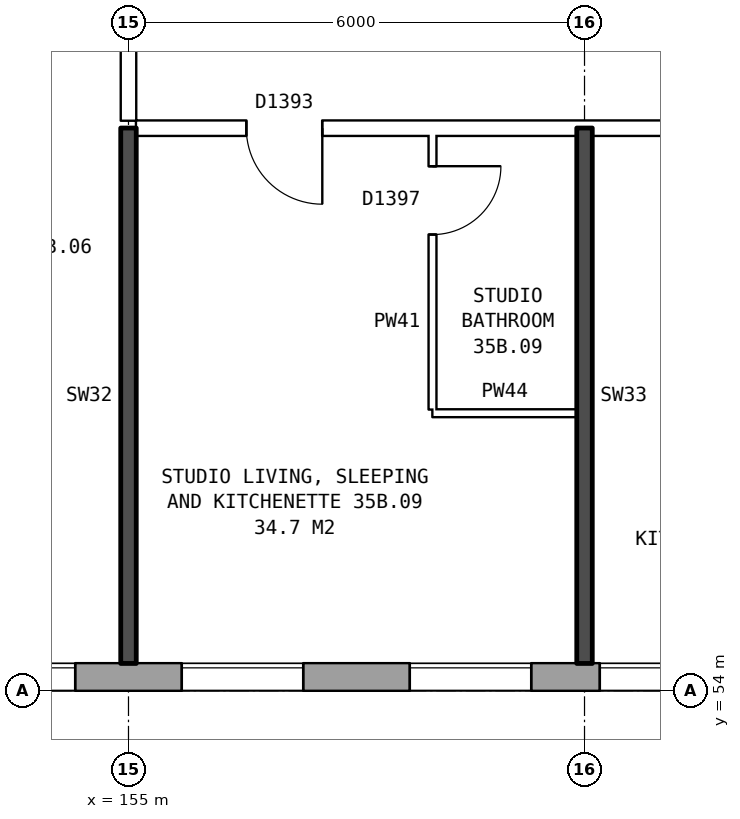
"""IFC4 building model, lengths in metres.
Left out: names, types, materials, properties, quantities, classifications, styles, units other than length and angle.
Written with IfcOpenShell. Run it as: python <this file> out.ifc"""

import sys

from ifc_helpers import new_model, si_unit, direction, frame, frame_2d, origin, place, context, subcontext, project, spatial, rectangle, extrude, element, fill, save


model = new_model("IFC4")
c1 = context("Model", 3, precision=1e-05, world=origin(), true_north=direction((0.0, 1.0)))
c2 = subcontext(c1, "Body", "Model", "MODEL_VIEW")
j1 = project(units=[si_unit("LENGTHUNIT", "METRE"), si_unit("PLANEANGLEUNIT", "RADIAN")], contexts=[c1])
p1 = place(None, origin())
s1 = spatial("IfcSite", under=j1, at=p1, CompositionType="ELEMENT")
p2 = place(p1, origin())
s2 = spatial("IfcBuilding", under=s1, at=p2, CompositionType="ELEMENT")
p3 = place(p2, frame((0.0, 0.0, 126.8)))
s3 = spatial("IfcBuildingStorey", under=s2, at=p3, CompositionType="ELEMENT", Elevation=126.8)
p4 = place(p3, frame((134.075, 54.18, 0.0), z_axis=(0.0, 0.0, 1.0), x_axis=(1.0, 0.0, 0.0)))
e1 = element("IfcWall", 1, at=p4, inside=s3, PredefinedType="STANDARD", context=c2, shape_type="SweptSolid", body=[
    extrude(rectangle(XDim=35.601, YDim=0.36, at=frame_2d((17.8, 0.0))), origin(), (0.0, 0.0, 1.0), 2.85),
])
p5 = place(p4, frame((0.625, 0.0, 0.8)))
e2 = element("IfcOpeningElement", 2, at=p5, cuts=e1, PredefinedType="OPENING", context=c2, shape_type="SweptSolid", body=[
    extrude(rectangle(XDim=1.6, YDim=1.8, at=frame_2d((0.8, 0.9))), frame((0.0, 0.19, 0.0), z_axis=(0.0, -1.0, 0.0), x_axis=(1.0, 0.0, 0.0)), (0.0, 0.0, 1.0), 0.38),
])
p6 = place(p4, frame((3.125, 0.0, 0.8)))
e3 = element("IfcOpeningElement", 3, at=p6, cuts=e1, PredefinedType="OPENING", context=c2, shape_type="SweptSolid", body=[
    extrude(rectangle(XDim=0.8, YDim=1.8, at=frame_2d((0.4, 0.9))), frame((0.0, 0.19, 0.0), z_axis=(0.0, -1.0, 0.0), x_axis=(1.0, 0.0, 0.0)), (0.0, 0.0, 1.0), 0.38),
])
p7 = place(p4, frame((6.625, 0.0, 0.8)))
e4 = element("IfcOpeningElement", 4, at=p7, cuts=e1, PredefinedType="OPENING", context=c2, shape_type="SweptSolid", body=[
    extrude(rectangle(XDim=1.6, YDim=1.8, at=frame_2d((0.8, 0.9))), frame((0.0, 0.19, 0.0), z_axis=(0.0, -1.0, 0.0), x_axis=(1.0, 0.0, 0.0)), (0.0, 0.0, 1.0), 0.38),
])
p8 = place(p4, frame((9.625, 0.0, 0.8)))
e5 = element("IfcOpeningElement", 5, at=p8, cuts=e1, PredefinedType="OPENING", context=c2, shape_type="SweptSolid", body=[
    extrude(rectangle(XDim=1.6, YDim=1.8, at=frame_2d((0.8, 0.9))), frame((0.0, 0.19, 0.0), z_axis=(0.0, -1.0, 0.0), x_axis=(1.0, 0.0, 0.0)), (0.0, 0.0, 1.0), 0.38),
])
p9 = place(p4, frame((12.625, 0.0, 0.8)))
e6 = element("IfcOpeningElement", 6, at=p9, cuts=e1, PredefinedType="OPENING", context=c2, shape_type="SweptSolid", body=[
    extrude(rectangle(XDim=1.6, YDim=1.8, at=frame_2d((0.8, 0.9))), frame((0.0, 0.19, 0.0), z_axis=(0.0, -1.0, 0.0), x_axis=(1.0, 0.0, 0.0)), (0.0, 0.0, 1.0), 0.38),
])
p10 = place(p4, frame((15.625, 0.0, 0.8)))
e7 = element("IfcOpeningElement", 7, at=p10, cuts=e1, PredefinedType="OPENING", context=c2, shape_type="SweptSolid", body=[
    extrude(rectangle(XDim=1.6, YDim=1.8, at=frame_2d((0.8, 0.9))), frame((0.0, 0.19, 0.0), z_axis=(0.0, -1.0, 0.0), x_axis=(1.0, 0.0, 0.0)), (0.0, 0.0, 1.0), 0.38),
])
p11 = place(p4, frame((18.625, 0.0, 0.8)))
e8 = element("IfcOpeningElement", 8, at=p11, cuts=e1, PredefinedType="OPENING", context=c2, shape_type="SweptSolid", body=[
    extrude(rectangle(XDim=1.6, YDim=1.8, at=frame_2d((0.8, 0.9))), frame((0.0, 0.19, 0.0), z_axis=(0.0, -1.0, 0.0), x_axis=(1.0, 0.0, 0.0)), (0.0, 0.0, 1.0), 0.38),
])
p12 = place(p4, frame((21.625, 0.0, 0.8)))
e9 = element("IfcOpeningElement", 9, at=p12, cuts=e1, PredefinedType="OPENING", context=c2, shape_type="SweptSolid", body=[
    extrude(rectangle(XDim=1.6, YDim=1.8, at=frame_2d((0.8, 0.9))), frame((0.0, 0.19, 0.0), z_axis=(0.0, -1.0, 0.0), x_axis=(1.0, 0.0, 0.0)), (0.0, 0.0, 1.0), 0.38),
])
p13 = place(p4, frame((24.625, 0.0, 0.8)))
e10 = element("IfcOpeningElement", 10, at=p13, cuts=e1, PredefinedType="OPENING", context=c2, shape_type="SweptSolid", body=[
    extrude(rectangle(XDim=1.6, YDim=1.8, at=frame_2d((0.8, 0.9))), frame((0.0, 0.19, 0.0), z_axis=(0.0, -1.0, 0.0), x_axis=(1.0, 0.0, 0.0)), (0.0, 0.0, 1.0), 0.38),
])
p14 = place(p4, frame((27.125, 0.0, 0.8)))
e11 = element("IfcOpeningElement", 11, at=p14, cuts=e1, PredefinedType="OPENING", context=c2, shape_type="SweptSolid", body=[
    extrude(rectangle(XDim=1.6, YDim=1.8, at=frame_2d((0.8, 0.9))), frame((0.0, 0.19, 0.0), z_axis=(0.0, -1.0, 0.0), x_axis=(1.0, 0.0, 0.0)), (0.0, 0.0, 1.0), 0.38),
])
p15 = place(p4, frame((29.025, 0.0, 0.8)))
e12 = element("IfcOpeningElement", 12, at=p15, cuts=e1, PredefinedType="OPENING", context=c2, shape_type="SweptSolid", body=[
    extrude(rectangle(XDim=0.6, YDim=0.9, at=frame_2d((0.3, 0.45))), frame((0.0, 0.19, 0.0), z_axis=(0.0, -1.0, 0.0), x_axis=(1.0, 0.0, 0.0)), (0.0, 0.0, 1.0), 0.38),
])
p16 = place(p4, frame((33.625, 0.0, 0.8)))
e13 = element("IfcOpeningElement", 13, at=p16, cuts=e1, PredefinedType="OPENING", context=c2, shape_type="SweptSolid", body=[
    extrude(rectangle(XDim=1.6, YDim=1.8, at=frame_2d((0.8, 0.9))), frame((0.0, 0.19, 0.0), z_axis=(0.0, -1.0, 0.0), x_axis=(1.0, 0.0, 0.0)), (0.0, 0.0, 1.0), 0.38),
])
p17 = place(p4, frame((4.225, 0.0, 1.6)))
e14 = element("IfcOpeningElement", 14, at=p17, cuts=e1, PredefinedType="OPENING", context=c2, shape_type="SweptSolid", body=[
    extrude(rectangle(XDim=0.6, YDim=0.9, at=frame_2d((0.3, 0.45))), frame((0.0, 0.19, 0.0), z_axis=(0.0, -1.0, 0.0), x_axis=(1.0, 0.0, 0.0)), (0.0, 0.0, 1.0), 0.38),
])
p18 = place(p4, frame((30.675, 0.0, 1.7)))
e15 = element("IfcOpeningElement", 15, at=p18, cuts=e1, PredefinedType="OPENING", context=c2, shape_type="SweptSolid", body=[
    extrude(rectangle(XDim=0.6, YDim=0.9, at=frame_2d((0.3, 0.45))), frame((0.0, 0.19, 0.0), z_axis=(0.0, -1.0, 0.0), x_axis=(1.0, 0.0, 0.0)), (0.0, 0.0, 1.0), 0.38),
])
p19 = place(p4, frame((31.575, 0.0, 0.8)))
e16 = element("IfcOpeningElement", 16, at=p19, cuts=e1, PredefinedType="OPENING", context=c2, shape_type="SweptSolid", body=[
    extrude(rectangle(XDim=1.0, YDim=1.8, at=frame_2d((0.5, 0.9))), frame((0.0, 0.19, 0.0), z_axis=(0.0, -1.0, 0.0), x_axis=(1.0, 0.0, 0.0)), (0.0, 0.0, 1.0), 0.38),
])
p20 = place(p3, frame((159.0, 57.65, 0.0), z_axis=(0.0, 0.0, 1.0), x_axis=(1.0, 0.0, 0.0)))
e17 = element("IfcWall", 17, at=p20, inside=s3, PredefinedType="PARTITIONING", context=c2, shape_type="SweptSolid", body=[
    extrude(rectangle(XDim=1.9, YDim=0.1, at=frame_2d((0.95, 0.0))), origin(), (0.0, 0.0, 1.0), 2.85),
])
p21 = place(p3, frame((155.1, 61.4, 0.0), z_axis=(0.0, 0.0, 1.0), x_axis=(1.0, 0.0, 0.0)))
e18 = element("IfcWall", 18, at=p21, inside=s3, PredefinedType="PARTITIONING", context=c2, shape_type="SweptSolid", body=[
    extrude(rectangle(XDim=17.29, YDim=0.2, at=frame_2d((8.645, 0.0))), origin(), (0.0, 0.0, 1.0), 2.85),
])
p22 = place(p21, frame((1.45, 0.0, 0.0)))
e19 = element("IfcOpeningElement", 19, at=p22, cuts=e18, PredefinedType="OPENING", context=c2, shape_type="SweptSolid", body=[
    extrude(rectangle(XDim=1.0, YDim=2.1, at=frame_2d((0.5, 1.05))), frame((0.0, 0.11, 0.0), z_axis=(0.0, -1.0, 0.0), x_axis=(1.0, 0.0, 0.0)), (0.0, 0.0, 1.0), 0.22),
])
p23 = place(p21, frame((8.4, 0.0, 0.0)))
e20 = element("IfcOpeningElement", 20, at=p23, cuts=e18, PredefinedType="OPENING", context=c2, shape_type="SweptSolid", body=[
    extrude(rectangle(XDim=1.0, YDim=2.1, at=frame_2d((0.5, 1.05))), frame((0.0, 0.11, 0.0), z_axis=(0.0, -1.0, 0.0), x_axis=(1.0, 0.0, 0.0)), (0.0, 0.0, 1.0), 0.22),
])
p24 = place(p3, frame((155.0, 54.36, 0.0), z_axis=(0.0, 0.0, 1.0), x_axis=(0.0, 1.0, 0.0)))
e21 = element("IfcWall", 21, at=p24, inside=s3, PredefinedType="SOLIDWALL", context=c2, shape_type="SweptSolid", body=[
    extrude(rectangle(XDim=7.04, YDim=0.2, at=frame_2d((3.52, 0.0))), origin(), (0.0, 0.0, 1.0), 2.85),
])
p25 = place(p3, frame((155.0, 61.5, 0.0), z_axis=(0.0, 0.0, 1.0), x_axis=(0.0, 1.0, 0.0)))
e22 = element("IfcWall", 22, at=p25, inside=s3, PredefinedType="PARTITIONING", context=c2, shape_type="SweptSolid", body=[
    extrude(rectangle(XDim=2.2, YDim=0.2, at=frame_2d((1.1, 0.0))), origin(), (0.0, 0.0, 1.0), 2.85),
])
p26 = place(p3, frame((159.0, 57.7, 0.0), z_axis=(0.0, 0.0, 1.0), x_axis=(0.0, 1.0, 0.0)))
e23 = element("IfcWall", 23, at=p26, inside=s3, PredefinedType="PARTITIONING", context=c2, shape_type="SweptSolid", body=[
    extrude(rectangle(XDim=3.6, YDim=0.1, at=frame_2d((1.8, 0.0))), origin(), (0.0, 0.0, 1.0), 2.85),
])
p27 = place(p26, frame((2.3, 0.0, 0.0)))
e24 = element("IfcOpeningElement", 24, at=p27, cuts=e23, PredefinedType="OPENING", context=c2, shape_type="SweptSolid", body=[
    extrude(rectangle(XDim=0.9, YDim=2.1, at=frame_2d((0.45, 1.05))), frame((0.0, 0.06, 0.0), z_axis=(0.0, -1.0, 0.0), x_axis=(1.0, 0.0, 0.0)), (0.0, 0.0, 1.0), 0.12),
])
p28 = place(p3, frame((161.0, 54.36, 0.0), z_axis=(0.0, 0.0, 1.0), x_axis=(0.0, 1.0, 0.0)))
e25 = element("IfcWall", 25, at=p28, inside=s3, PredefinedType="SOLIDWALL", context=c2, shape_type="SweptSolid", body=[
    extrude(rectangle(XDim=7.04, YDim=0.2, at=frame_2d((3.52, 0.0))), origin(), (0.0, 0.0, 1.0), 2.85),
])
p29 = place(p11, origin())
e26 = element("IfcWindow", 26, at=p29, inside=s3, PartitioningType="SINGLE_PANEL", PredefinedType="WINDOW", context=c2, shape_type="SweptSolid", body=[
    extrude(rectangle(XDim=1.6, YDim=1.8, at=frame_2d((0.8, 0.9))), frame((0.0, 0.15, 0.0), z_axis=(0.0, -1.0, 0.0), x_axis=(1.0, 0.0, 0.0)), (0.0, 0.0, 1.0), 0.06),
])
fill(e8, e26)
p30 = place(p12, origin())
e27 = element("IfcWindow", 27, at=p30, inside=s3, PartitioningType="SINGLE_PANEL", PredefinedType="WINDOW", context=c2, shape_type="SweptSolid", body=[
    extrude(rectangle(XDim=1.6, YDim=1.8, at=frame_2d((0.8, 0.9))), frame((0.0, 0.15, 0.0), z_axis=(0.0, -1.0, 0.0), x_axis=(1.0, 0.0, 0.0)), (0.0, 0.0, 1.0), 0.06),
])
fill(e9, e27)
p31 = place(p13, origin())
e28 = element("IfcWindow", 28, at=p31, inside=s3, PartitioningType="SINGLE_PANEL", PredefinedType="WINDOW", context=c2, shape_type="SweptSolid", body=[
    extrude(rectangle(XDim=1.6, YDim=1.8, at=frame_2d((0.8, 0.9))), frame((0.0, 0.15, 0.0), z_axis=(0.0, -1.0, 0.0), x_axis=(1.0, 0.0, 0.0)), (0.0, 0.0, 1.0), 0.06),
])
fill(e10, e28)
p32 = place(p14, origin())
e29 = element("IfcWindow", 29, at=p32, inside=s3, PartitioningType="SINGLE_PANEL", PredefinedType="WINDOW", context=c2, shape_type="SweptSolid", body=[
    extrude(rectangle(XDim=1.6, YDim=1.8, at=frame_2d((0.8, 0.9))), frame((0.0, 0.15, 0.0), z_axis=(0.0, -1.0, 0.0), x_axis=(1.0, 0.0, 0.0)), (0.0, 0.0, 1.0), 0.06),
])
fill(e11, e29)
p33 = place(p22, frame((1.0, 0.0, 0.0), z_axis=(0.0, 0.0, 1.0), x_axis=(-1.0, 0.0, 0.0)))
e30 = element("IfcDoor", 30, at=p33, inside=s3, OperationType="SINGLE_SWING_LEFT", PredefinedType="DOOR", context=c2, shape_type="SweptSolid", body=[
    extrude(rectangle(XDim=1.0, YDim=2.1, at=frame_2d((0.5, 1.05))), frame((0.0, 0.025, 0.0), z_axis=(0.0, -1.0, 0.0), x_axis=(1.0, 0.0, 0.0)), (0.0, 0.0, 1.0), 0.05),
])
fill(e19, e30)
p34 = place(p27, frame((0.9, 0.0, 0.0), z_axis=(0.0, 0.0, 1.0), x_axis=(-1.0, 0.0, 0.0)))
e31 = element("IfcDoor", 31, at=p34, inside=s3, OperationType="SINGLE_SWING_LEFT", PredefinedType="DOOR", context=c2, shape_type="SweptSolid", body=[
    extrude(rectangle(XDim=0.9, YDim=2.1, at=frame_2d((0.45, 1.05))), frame((0.0, 0.025, 0.0), z_axis=(0.0, -1.0, 0.0), x_axis=(1.0, 0.0, 0.0)), (0.0, 0.0, 1.0), 0.05),
])
fill(e24, e31)
save(model, sys.argv[1])
